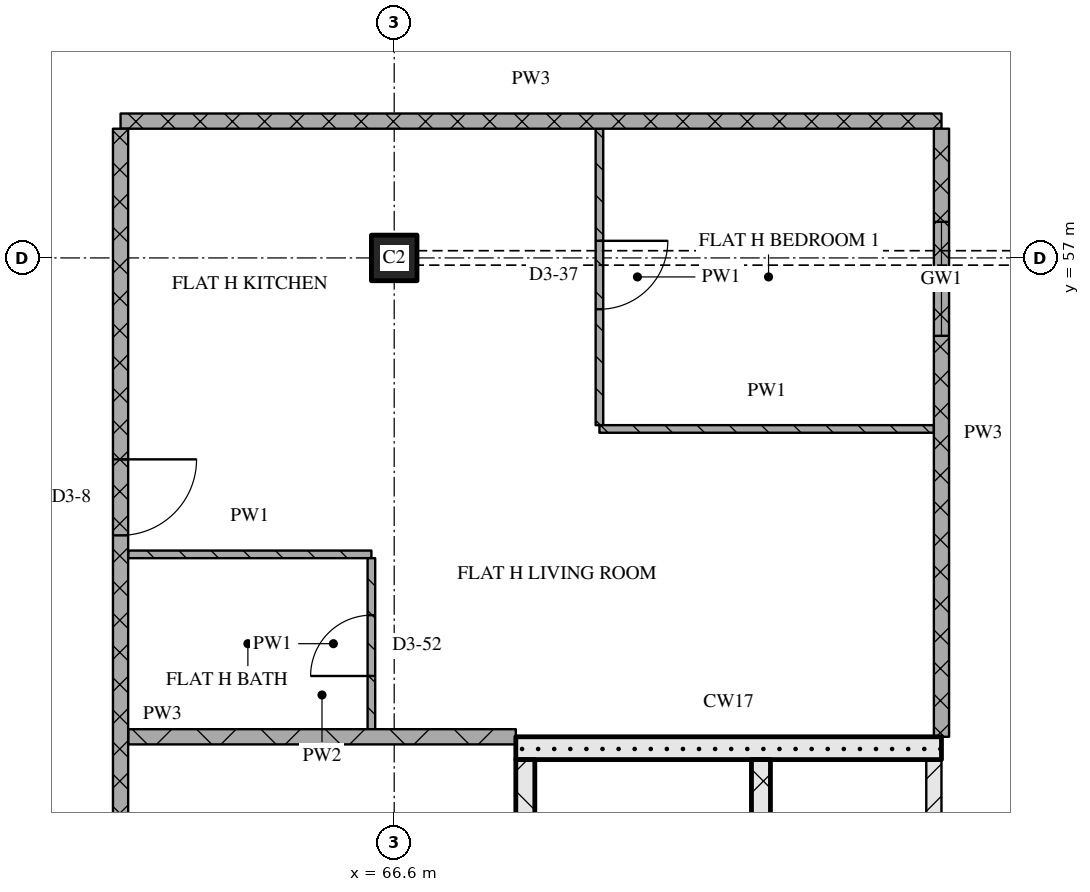
"""IFC4 building model, lengths in metres.
Left out: names, types, materials, properties, quantities, classifications, styles, units other than length and angle.
Written with IfcOpenShell. Run it as: python <this file> out.ifc"""

import sys

from ifc_helpers import new_model, si_unit, direction, frame, frame_2d, origin, origin_2d, place, context, subcontext, project, spatial, rectangle, extrude, element, fill, save


model = new_model("IFC4")
c1 = context("Model", 3, precision=1e-05, world=origin(), true_north=direction((0.0, 1.0)))
c2 = subcontext(c1, "Body", "Model", "MODEL_VIEW")
j1 = project(units=[si_unit("LENGTHUNIT", "METRE"), si_unit("PLANEANGLEUNIT", "RADIAN")], contexts=[c1])
p1 = place(None, origin())
s1 = spatial("IfcSite", under=j1, at=p1, CompositionType="ELEMENT")
p2 = place(p1, origin())
s2 = spatial("IfcBuilding", under=s1, at=p2, CompositionType="ELEMENT")
p3 = place(p2, frame((0.0, 0.0, 234.3)))
s3 = spatial("IfcBuildingStorey", under=s2, at=p3, CompositionType="ELEMENT", Elevation=234.3)
p4 = place(p3, frame((66.6, 57.0, 0.0), z_axis=(0.0, 0.0, 1.0), x_axis=(1.0, 0.0, 0.0)))
e1 = element("IfcColumn", 1, at=p4, inside=s3, PredefinedType="COLUMN", context=c2, shape_type="SweptSolid", body=[
    extrude(rectangle(XDim=0.6, YDim=0.6, at=origin_2d()), origin(), (0.0, 0.0, 1.0), 3.6),
])
p5 = place(p3, frame((68.325, 43.5, 0.0), z_axis=(0.0, 0.0, 1.0), x_axis=(0.0, 1.0, 0.0)))
e2 = element("IfcWall", 2, at=p5, inside=s3, PredefinedType="SOLIDWALL", context=c2, shape_type="SweptSolid", body=[
    extrude(rectangle(XDim=6.9, YDim=0.25, at=frame_2d((3.45, 0.0))), origin(), (0.0, 0.0, 1.0), 3.32),
])
p6 = place(p3, frame((71.425, 43.5, 0.0), z_axis=(0.0, 0.0, 1.0), x_axis=(0.0, 1.0, 0.0)))
e3 = element("IfcWall", 3, at=p6, inside=s3, PredefinedType="SOLIDWALL", context=c2, shape_type="SweptSolid", body=[
    extrude(rectangle(XDim=6.9, YDim=0.25, at=frame_2d((3.45, 0.0))), origin(), (0.0, 0.0, 1.0), 3.32),
])
p7 = place(p6, frame((0.2, 0.0, 0.0)))
e4 = element("IfcOpeningElement", 4, at=p7, cuts=e3, PredefinedType="OPENING", context=c2, shape_type="SweptSolid", body=[
    extrude(rectangle(XDim=1.0, YDim=2.1, at=frame_2d((0.5, 1.05))), frame((0.0, 0.135, 0.0), z_axis=(0.0, -1.0, 0.0), x_axis=(1.0, 0.0, 0.0)), (0.0, 0.0, 1.0), 0.27),
])
p8 = place(p3, frame((73.7, 43.5, 0.0), z_axis=(0.0, 0.0, 1.0), x_axis=(0.0, 1.0, 0.0)))
e5 = element("IfcWall", 5, at=p8, inside=s3, PredefinedType="PARTITIONING", context=c2, shape_type="SweptSolid", body=[
    extrude(rectangle(XDim=6.9, YDim=0.2, at=frame_2d((3.45, 0.0))), origin(), (0.0, 0.0, 1.0), 3.32),
])
p9 = place(p8, frame((1.0, 0.0, 0.0)))
e6 = element("IfcOpeningElement", 6, at=p9, cuts=e5, PredefinedType="OPENING", context=c2, shape_type="SweptSolid", body=[
    extrude(rectangle(XDim=1.0, YDim=2.1, at=frame_2d((0.5, 1.05))), frame((0.0, 0.11, 0.0), z_axis=(0.0, -1.0, 0.0), x_axis=(1.0, 0.0, 0.0)), (0.0, 0.0, 1.0), 0.22),
])
p10 = place(p3, frame((68.2, 50.55, 0.0), z_axis=(0.0, 0.0, 1.0), x_axis=(1.0, 0.0, 0.0)))
e7 = element("IfcWall", 7, at=p10, inside=s3, PredefinedType="SOLIDWALL", context=c2, shape_type="SweptSolid", body=[
    extrude(rectangle(XDim=5.6, YDim=0.3, at=frame_2d((2.8, 0.0))), origin(), (0.0, 0.0, 1.0), 3.32),
])
p11 = place(p3, frame((63.1, 50.7, 0.0), z_axis=(0.0, 0.0, 1.0), x_axis=(1.0, 0.0, 0.0)))
e8 = element("IfcWall", 8, at=p11, inside=s3, PredefinedType="PARTITIONING", context=c2, shape_type="SweptSolid", body=[
    extrude(rectangle(XDim=5.1, YDim=0.2, at=frame_2d((2.55, 0.0))), origin(), (0.0, 0.0, 1.0), 3.32),
])
p12 = place(p3, frame((63.1, 53.1, 0.0), z_axis=(0.0, 0.0, 1.0), x_axis=(1.0, 0.0, 0.0)))
e9 = element("IfcWall", 9, at=p12, inside=s3, PredefinedType="PARTITIONING", context=c2, shape_type="SweptSolid", body=[
    extrude(rectangle(XDim=3.2, YDim=0.1, at=frame_2d((1.6, 0.0))), origin(), (0.0, 0.0, 1.0), 3.32),
])
p13 = place(p3, frame((69.3, 54.75, 0.0), z_axis=(0.0, 0.0, 1.0), x_axis=(1.0, 0.0, 0.0)))
e10 = element("IfcWall", 10, at=p13, inside=s3, PredefinedType="PARTITIONING", context=c2, shape_type="SweptSolid", body=[
    extrude(rectangle(XDim=4.4, YDim=0.1, at=frame_2d((2.2, 0.0))), origin(), (0.0, 0.0, 1.0), 3.32),
])
p14 = place(p3, frame((63.0, 58.8, 0.0), z_axis=(0.0, 0.0, 1.0), x_axis=(1.0, 0.0, 0.0)))
e11 = element("IfcWall", 11, at=p14, inside=s3, PredefinedType="PARTITIONING", context=c2, shape_type="SweptSolid", body=[
    extrude(rectangle(XDim=10.8, YDim=0.2, at=frame_2d((5.4, 0.0))), origin(), (0.0, 0.0, 1.0), 3.32),
])
p15 = place(p3, frame((63.0, 58.7, 0.0), z_axis=(0.0, 0.0, 1.0), x_axis=(0.0, -1.0, 0.0)))
e12 = element("IfcWall", 12, at=p15, inside=s3, PredefinedType="PARTITIONING", context=c2, shape_type="SweptSolid", body=[
    extrude(rectangle(XDim=15.4, YDim=0.2, at=frame_2d((7.7, 0.0))), origin(), (0.0, 0.0, 1.0), 3.32),
])
p16 = place(p15, frame((4.35, 0.0, 0.0)))
e13 = element("IfcOpeningElement", 13, at=p16, cuts=e12, PredefinedType="OPENING", context=c2, shape_type="SweptSolid", body=[
    extrude(rectangle(XDim=1.0, YDim=2.1, at=frame_2d((0.5, 1.05))), frame((0.0, 0.11, 0.0), z_axis=(0.0, -1.0, 0.0), x_axis=(1.0, 0.0, 0.0)), (0.0, 0.0, 1.0), 0.22),
])
p17 = place(p15, frame((11.25, 0.0, 0.0)))
e14 = element("IfcOpeningElement", 14, at=p17, cuts=e12, PredefinedType="OPENING", context=c2, shape_type="SweptSolid", body=[
    extrude(rectangle(XDim=0.9, YDim=2.1, at=frame_2d((0.45, 1.05))), frame((0.0, 0.11, 0.0), z_axis=(0.0, -1.0, 0.0), x_axis=(1.0, 0.0, 0.0)), (0.0, 0.0, 1.0), 0.22),
])
p18 = place(p3, frame((66.3, 50.8, 0.0), z_axis=(0.0, 0.0, 1.0), x_axis=(0.0, 1.0, 0.0)))
e15 = element("IfcWall", 15, at=p18, inside=s3, PredefinedType="PARTITIONING", context=c2, shape_type="SweptSolid", body=[
    extrude(rectangle(XDim=2.25, YDim=0.1, at=frame_2d((1.125, 0.0))), origin(), (0.0, 0.0, 1.0), 3.32),
])
p19 = place(p18, frame((0.7, 0.0, 0.0)))
e16 = element("IfcOpeningElement", 16, at=p19, cuts=e15, PredefinedType="OPENING", context=c2, shape_type="SweptSolid", body=[
    extrude(rectangle(XDim=0.8, YDim=2.1, at=frame_2d((0.4, 1.05))), frame((0.0, 0.06, 0.0), z_axis=(0.0, -1.0, 0.0), x_axis=(1.0, 0.0, 0.0)), (0.0, 0.0, 1.0), 0.12),
])
p20 = place(p3, frame((69.3, 58.7, 0.0), z_axis=(0.0, 0.0, 1.0), x_axis=(0.0, -1.0, 0.0)))
e17 = element("IfcWall", 17, at=p20, inside=s3, PredefinedType="PARTITIONING", context=c2, shape_type="SweptSolid", body=[
    extrude(rectangle(XDim=3.9, YDim=0.1, at=frame_2d((1.95, 0.0))), origin(), (0.0, 0.0, 1.0), 3.32),
])
p21 = place(p20, frame((1.475, 0.0, 0.0)))
e18 = element("IfcOpeningElement", 18, at=p21, cuts=e17, PredefinedType="OPENING", context=c2, shape_type="SweptSolid", body=[
    extrude(rectangle(XDim=0.9, YDim=2.1, at=frame_2d((0.45, 1.05))), frame((0.0, 0.06, 0.0), z_axis=(0.0, -1.0, 0.0), x_axis=(1.0, 0.0, 0.0)), (0.0, 0.0, 1.0), 0.12),
])
p22 = place(p3, frame((73.8, 58.7, 0.0), z_axis=(0.0, 0.0, 1.0), x_axis=(0.0, -1.0, 0.0)))
e19 = element("IfcWall", 19, at=p22, inside=s3, PredefinedType="PARTITIONING", context=c2, shape_type="SweptSolid", body=[
    extrude(rectangle(XDim=8.0, YDim=0.2, at=frame_2d((4.0, 0.0))), origin(), (0.0, 0.0, 1.0), 3.32),
])
p23 = place(p22, frame((1.225, 0.0, 0.9)))
e20 = element("IfcOpeningElement", 20, at=p23, cuts=e19, PredefinedType="OPENING", context=c2, shape_type="SweptSolid", body=[
    extrude(rectangle(XDim=1.5, YDim=1.5, at=frame_2d((0.75, 0.75))), frame((0.0, 0.11, 0.0), z_axis=(0.0, -1.0, 0.0), x_axis=(1.0, 0.0, 0.0)), (0.0, 0.0, 1.0), 0.22),
])
p24 = place(p16, origin())
e21 = element("IfcDoor", 21, at=p24, inside=s3, OperationType="SINGLE_SWING_LEFT", PredefinedType="DOOR", context=c2, shape_type="SweptSolid", body=[
    extrude(rectangle(XDim=1.0, YDim=2.1, at=frame_2d((0.5, 1.05))), frame((0.0, 0.025, 0.0), z_axis=(0.0, -1.0, 0.0), x_axis=(1.0, 0.0, 0.0)), (0.0, 0.0, 1.0), 0.05),
])
fill(e13, e21)
p25 = place(p19, origin())
e22 = element("IfcDoor", 22, at=p25, inside=s3, OperationType="SINGLE_SWING_LEFT", PredefinedType="DOOR", context=c2, shape_type="SweptSolid", body=[
    extrude(rectangle(XDim=0.8, YDim=2.1, at=frame_2d((0.4, 1.05))), frame((0.0, 0.025, 0.0), z_axis=(0.0, -1.0, 0.0), x_axis=(1.0, 0.0, 0.0)), (0.0, 0.0, 1.0), 0.05),
])
fill(e16, e22)
p26 = place(p21, origin())
e23 = element("IfcDoor", 23, at=p26, inside=s3, OperationType="SINGLE_SWING_LEFT", PredefinedType="DOOR", context=c2, shape_type="SweptSolid", body=[
    extrude(rectangle(XDim=0.9, YDim=2.1, at=frame_2d((0.45, 1.05))), frame((0.0, 0.025, 0.0), z_axis=(0.0, -1.0, 0.0), x_axis=(1.0, 0.0, 0.0)), (0.0, 0.0, 1.0), 0.05),
])
fill(e18, e23)
p27 = place(p23, origin())
e24 = element("IfcWindow", 24, at=p27, inside=s3, PartitioningType="SINGLE_PANEL", PredefinedType="WINDOW", context=c2, shape_type="SweptSolid", body=[
    extrude(rectangle(XDim=1.5, YDim=1.5, at=frame_2d((0.75, 0.75))), frame((0.0, 0.03, 0.0), z_axis=(0.0, -1.0, 0.0), x_axis=(1.0, 0.0, 0.0)), (0.0, 0.0, 1.0), 0.06),
])
fill(e20, e24)
save(model, sys.argv[1])
